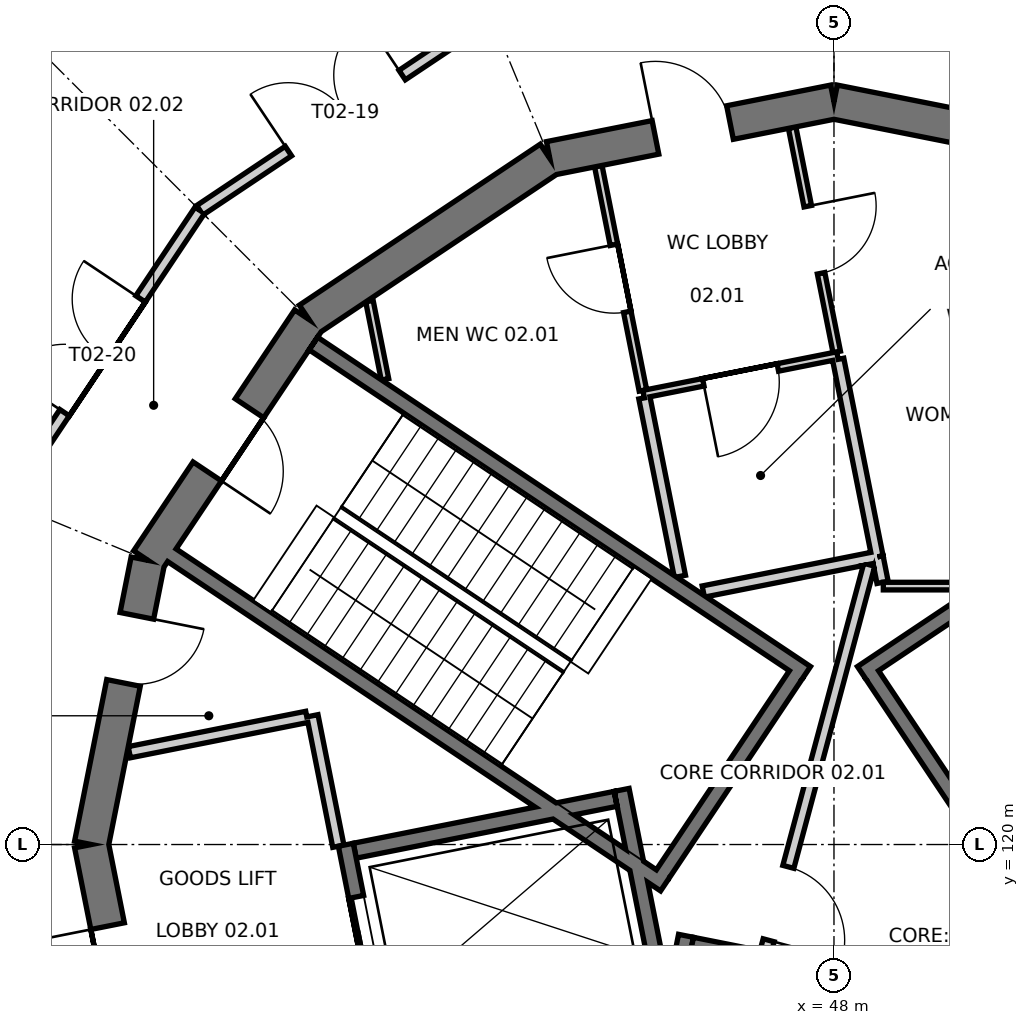
"""IFC4 building model, lengths in metres.
Left out: names, types, materials, properties, quantities, classifications, styles, units other than length and angle.
Written with IfcOpenShell. Run it as: python <this file> out.ifc"""

import sys

from ifc_helpers import new_model, si_unit, direction, frame, frame_2d, origin, place, context, subcontext, project, spatial, polyline, rectangle, outline, extrude, element, fill, save


model = new_model("IFC4")
c1 = context("Model", 3, precision=1e-05, world=origin(), true_north=direction((0.0, 1.0)))
c2 = subcontext(c1, "Body", "Model", "MODEL_VIEW")
j1 = project(units=[si_unit("LENGTHUNIT", "METRE"), si_unit("PLANEANGLEUNIT", "RADIAN")], contexts=[c1])
p1 = place(None, origin())
s1 = spatial("IfcSite", under=j1, at=p1, CompositionType="ELEMENT")
p2 = place(p1, origin())
s2 = spatial("IfcBuilding", under=s1, at=p2, CompositionType="ELEMENT")
p3 = place(p2, frame((0.0, 0.0, 10.8)))
s3 = spatial("IfcBuildingStorey", under=s2, at=p3, CompositionType="ELEMENT", Elevation=10.8)
p4 = place(p3, frame((51.739, 129.027, 0.0), z_axis=(0.0, 0.0, 1.0), x_axis=(-0.98078948206, 0.195069197673, 0.0)))
e1 = element("IfcWall", 1, at=p4, inside=s3, PredefinedType="SHEAR", context=c2, shape_type="SweptSolid", body=[
    extrude(outline(polyline([(-0.045, -0.225), (3.857, -0.225), (3.768, 0.225), (0.045, 0.225), (-0.045, -0.225)])), origin(), (0.0, 0.0, 1.0), 4.8),
])
p5 = place(p3, frame((48.0, 129.771, 0.0), z_axis=(0.0, 0.0, 1.0), x_axis=(-0.98078948206, -0.195069197673, 0.0)))
e2 = element("IfcWall", 2, at=p5, inside=s3, PredefinedType="SHEAR", context=c2, shape_type="SweptSolid", body=[
    extrude(outline(polyline([(-0.045, -0.225), (3.857, -0.225), (3.768, 0.225), (0.045, 0.225), (-0.045, -0.225)])), origin(), (0.0, 0.0, 1.0), 4.8),
])
p6 = place(p5, frame((1.395, 0.0, 0.0)))
e3 = element("IfcOpeningElement", 3, at=p6, cuts=e2, PredefinedType="OPENING", context=c2, shape_type="SweptSolid", body=[
    extrude(rectangle(XDim=1.0, YDim=2.1, at=frame_2d((0.5, 1.05))), frame((0.0, 0.235, 0.0), z_axis=(0.0, -1.0, 0.0), x_axis=(1.0, 0.0, 0.0)), (0.0, 0.0, 1.0), 0.47),
])
p7 = place(p3, frame((44.261, 129.027, 0.0), z_axis=(0.0, 0.0, 1.0), x_axis=(-0.83148829117, -0.555542277102, 0.0)))
e4 = element("IfcWall", 4, at=p7, inside=s3, PredefinedType="SHEAR", context=c2, shape_type="SweptSolid", body=[
    extrude(outline(polyline([(-0.045, -0.225), (3.857, -0.225), (3.768, 0.225), (0.045, 0.225), (-0.045, -0.225)])), origin(), (0.0, 0.0, 1.0), 4.8),
])
p8 = place(p3, frame((41.091, 126.909, 0.0), z_axis=(0.0, 0.0, 1.0), x_axis=(-0.555542277102, -0.83148829117, 0.0)))
e5 = element("IfcWall", 5, at=p8, inside=s3, PredefinedType="SHEAR", context=c2, shape_type="SweptSolid", body=[
    extrude(outline(polyline([(-0.045, -0.225), (3.857, -0.225), (3.768, 0.225), (0.045, 0.225), (-0.045, -0.225)])), origin(), (0.0, 0.0, 1.0), 4.8),
])
p9 = place(p8, frame((1.406, 0.0, 0.0)))
e6 = element("IfcOpeningElement", 6, at=p9, cuts=e5, PredefinedType="OPENING", context=c2, shape_type="SweptSolid", body=[
    extrude(rectangle(XDim=1.0, YDim=2.1, at=frame_2d((0.5, 1.05))), frame((0.0, 0.235, 0.0), z_axis=(0.0, -1.0, 0.0), x_axis=(1.0, 0.0, 0.0)), (0.0, 0.0, 1.0), 0.47),
])
p10 = place(p3, frame((38.973, 123.739, 0.0), z_axis=(0.0, 0.0, 1.0), x_axis=(-0.195069197673, -0.98078948206, 0.0)))
e7 = element("IfcWall", 7, at=p10, inside=s3, PredefinedType="SHEAR", context=c2, shape_type="SweptSolid", body=[
    extrude(outline(polyline([(-0.045, -0.225), (3.857, -0.225), (3.768, 0.225), (0.045, 0.225), (-0.045, -0.225)])), origin(), (0.0, 0.0, 1.0), 4.8),
])
p11 = place(p10, frame((0.745, 0.0, 0.0)))
e8 = element("IfcOpeningElement", 8, at=p11, cuts=e7, PredefinedType="OPENING", context=c2, shape_type="SweptSolid", body=[
    extrude(rectangle(XDim=0.9, YDim=2.1, at=frame_2d((0.45, 1.05))), frame((0.0, 0.235, 0.0), z_axis=(0.0, -1.0, 0.0), x_axis=(1.0, 0.0, 0.0)), (0.0, 0.0, 1.0), 0.47),
])
p12 = place(p3, frame((38.229, 120.0, 0.0), z_axis=(0.0, 0.0, 1.0), x_axis=(0.195069197673, -0.98078948206, 0.0)))
e9 = element("IfcWall", 9, at=p12, inside=s3, PredefinedType="SHEAR", context=c2, shape_type="SweptSolid", body=[
    extrude(outline(polyline([(-0.045, -0.225), (3.857, -0.225), (3.768, 0.225), (0.045, 0.225), (-0.045, -0.225)])), origin(), (0.0, 0.0, 1.0), 4.8),
])
p13 = place(p12, frame((1.095, 0.0, 0.0)))
e10 = element("IfcOpeningElement", 10, at=p13, cuts=e9, PredefinedType="OPENING", context=c2, shape_type="SweptSolid", body=[
    extrude(rectangle(XDim=1.6, YDim=2.1, at=frame_2d((0.8, 1.05))), frame((0.0, 0.235, 0.0), z_axis=(0.0, -1.0, 0.0), x_axis=(1.0, 0.0, 0.0)), (0.0, 0.0, 1.0), 0.47),
])
p14 = place(p3, frame((48.365, 122.258, 0.0), z_axis=(0.0, 0.0, 1.0), x_axis=(0.831476803301, 0.555559470779, 0.0)))
e11 = element("IfcWall", 11, at=p14, inside=s3, PredefinedType="SHEAR", context=c2, shape_type="SweptSolid", body=[
    extrude(rectangle(XDim=7.8, YDim=0.2, at=frame_2d((3.9, 0.0))), origin(), (0.0, 0.0, 1.0), 4.8),
])
p15 = place(p3, frame((50.253, 119.612, 0.0), z_axis=(0.0, 0.0, 1.0), x_axis=(-0.55555842186, 0.831477504146, 0.0)))
e12 = element("IfcWall", 12, at=p15, inside=s3, PredefinedType="SHEAR", context=c2, shape_type="SweptSolid", body=[
    extrude(rectangle(XDim=3.15, YDim=0.2, at=frame_2d((1.575, 0.0))), origin(), (0.0, 0.0, 1.0), 4.8),
])
p16 = place(p3, frame((45.774, 119.473, 0.0), z_axis=(0.0, 0.0, 1.0), x_axis=(-0.831486463828, 0.555545012102, 0.0)))
e13 = element("IfcWall", 13, at=p16, inside=s3, PredefinedType="SHEAR", context=c2, shape_type="SweptSolid", body=[
    extrude(rectangle(XDim=7.8, YDim=0.2, at=frame_2d((3.9, 0.0))), origin(), (0.0, 0.0, 1.0), 4.8),
])
p17 = place(p3, frame((47.635, 122.258, 0.0), z_axis=(0.0, 0.0, 1.0), x_axis=(-0.831476803301, 0.555559470779, 0.0)))
e14 = element("IfcWall", 14, at=p17, inside=s3, PredefinedType="SHEAR", context=c2, shape_type="SweptSolid", body=[
    extrude(rectangle(XDim=7.8, YDim=0.2, at=frame_2d((3.9, 0.0))), origin(), (0.0, 0.0, 1.0), 4.8),
])
p18 = place(p3, frame((47.497, 122.231, 0.0), z_axis=(0.0, 0.0, 1.0), x_axis=(-0.55555842186, -0.831477504146, 0.0)))
e15 = element("IfcWall", 15, at=p18, inside=s3, PredefinedType="SHEAR", context=c2, shape_type="SweptSolid", body=[
    extrude(rectangle(XDim=3.15, YDim=0.2, at=frame_2d((1.575, 0.0))), origin(), (0.0, 0.0, 1.0), 4.8),
])
p19 = place(p3, frame((46.053, 118.799, 0.0), z_axis=(0.0, 0.0, 1.0), x_axis=(-0.195092759861, -0.980784795483, 0.0)))
e16 = element("IfcWall", 16, at=p19, inside=s3, PredefinedType="SHEAR", context=c2, shape_type="SweptSolid", body=[
    extrude(rectangle(XDim=7.8, YDim=0.2, at=frame_2d((3.9, 0.0))), origin(), (0.0, 0.0, 1.0), 4.8),
])
p20 = place(p3, frame((46.132, 118.681, 0.0), z_axis=(0.0, 0.0, 1.0), x_axis=(0.980785830564, -0.195087556151, 0.0)))
e17 = element("IfcWall", 17, at=p20, inside=s3, PredefinedType="SHEAR", context=c2, shape_type="SweptSolid", body=[
    extrude(rectangle(XDim=3.15, YDim=0.2, at=frame_2d((1.575, 0.0))), origin(), (0.0, 0.0, 1.0), 4.8),
])
p21 = place(p3, frame((41.577, 119.997, 0.0), z_axis=(0.0, 0.0, 1.0), x_axis=(0.195120673769, -0.980779242576, 0.0)))
e18 = element("IfcWall", 18, at=p21, inside=s3, PredefinedType="SHEAR", context=c2, shape_type="SweptSolid", body=[
    extrude(rectangle(XDim=2.5, YDim=0.2, at=frame_2d((1.25, 0.0))), origin(), (0.0, 0.0, 1.0), 4.8),
])
p22 = place(p21, frame((0.7, 0.0, 0.0)))
e19 = element("IfcOpeningElement", 19, at=p22, cuts=e18, PredefinedType="OPENING", context=c2, shape_type="SweptSolid", body=[
    extrude(rectangle(XDim=1.1, YDim=2.1, at=frame_2d((0.55, 1.05))), frame((0.0, 0.11, 0.0), z_axis=(0.0, -1.0, 0.0), x_axis=(1.0, 0.0, 0.0)), (0.0, 0.0, 1.0), 0.22),
])
p23 = place(p3, frame((45.206, 120.719, 0.0), z_axis=(0.0, 0.0, 1.0), x_axis=(0.195158270522, -0.980771762158, 0.0)))
e20 = element("IfcWall", 20, at=p23, inside=s3, PredefinedType="SHEAR", context=c2, shape_type="SweptSolid", body=[
    extrude(rectangle(XDim=2.647, YDim=0.2, at=frame_2d((1.323, 0.0))), origin(), (0.0, 0.0, 1.0), 4.8),
])
p24 = place(p3, frame((45.127, 120.601, 0.0), z_axis=(0.0, 0.0, 1.0), x_axis=(-0.980794727808, -0.195042820694, 0.0)))
e21 = element("IfcWall", 21, at=p24, inside=s3, PredefinedType="SHEAR", context=c2, shape_type="SweptSolid", body=[
    extrude(rectangle(XDim=3.5, YDim=0.2, at=frame_2d((1.75, 0.0))), origin(), (0.0, 0.0, 1.0), 4.8),
])
p25 = place(p3, frame((41.479, 119.977, 0.0), z_axis=(0.0, 0.0, 1.0), x_axis=(-0.19501613536, 0.98080003413, 0.0)))
e22 = element("IfcWall", 22, at=p25, inside=s3, PredefinedType="PARTITIONING", context=c2, shape_type="SweptSolid", body=[
    extrude(rectangle(XDim=1.75, YDim=0.15, at=frame_2d((0.875, 0.0))), origin(), (0.0, 0.0, 1.0), 4.52),
])
p26 = place(p3, frame((41.064, 121.679, 0.0), z_axis=(0.0, 0.0, 1.0), x_axis=(-0.980781272394, -0.195110470559, 0.0)))
e23 = element("IfcWall", 23, at=p26, inside=s3, PredefinedType="PARTITIONING", context=c2, shape_type="SweptSolid", body=[
    extrude(rectangle(XDim=2.381, YDim=0.15, at=frame_2d((1.19, 0.0))), origin(), (0.0, 0.0, 1.0), 4.52),
])
p27 = place(p3, frame((48.046, 126.433, 0.0), z_axis=(0.0, 0.0, 1.0), x_axis=(-0.980778805994, -0.195122868248, 0.0)))
e24 = element("IfcWall", 24, at=p27, inside=s3, PredefinedType="PARTITIONING", context=c2, shape_type="SweptSolid", body=[
    extrude(rectangle(XDim=2.6, YDim=0.1, at=frame_2d((1.3, 0.0))), origin(), (0.0, 0.0, 1.0), 4.52),
])
p28 = place(p27, frame((0.8, 0.0, 0.0)))
e25 = element("IfcOpeningElement", 25, at=p28, cuts=e24, PredefinedType="OPENING", context=c2, shape_type="SweptSolid", body=[
    extrude(rectangle(XDim=1.0, YDim=2.1, at=frame_2d((0.5, 1.05))), frame((0.0, 0.06, 0.0), z_axis=(0.0, -1.0, 0.0), x_axis=(1.0, 0.0, 0.0)), (0.0, 0.0, 1.0), 0.12),
])
p29 = place(p3, frame((45.486, 125.974, 0.0), z_axis=(0.0, 0.0, 1.0), x_axis=(-0.195054549846, 0.980792395252, 0.0)))
e26 = element("IfcWall", 26, at=p29, inside=s3, PredefinedType="PARTITIONING", context=c2, shape_type="SweptSolid", body=[
    extrude(rectangle(XDim=3.008, YDim=0.1, at=frame_2d((1.504, 0.0))), origin(), (0.0, 0.0, 1.0), 4.52),
])
p30 = place(p29, frame((1.054, 0.0, 0.0)))
e27 = element("IfcOpeningElement", 27, at=p30, cuts=e26, PredefinedType="OPENING", context=c2, shape_type="SweptSolid", body=[
    extrude(rectangle(XDim=0.9, YDim=2.1, at=frame_2d((0.45, 1.05))), frame((0.0, 0.06, 0.0), z_axis=(0.0, -1.0, 0.0), x_axis=(1.0, 0.0, 0.0)), (0.0, 0.0, 1.0), 0.12),
])
p31 = place(p3, frame((47.449, 129.432, 0.0), z_axis=(0.0, 0.0, 1.0), x_axis=(0.195054549846, -0.980792395252, 0.0)))
e28 = element("IfcWall", 28, at=p31, inside=s3, PredefinedType="PARTITIONING", context=c2, shape_type="SweptSolid", body=[
    extrude(rectangle(XDim=3.008, YDim=0.1, at=frame_2d((1.504, 0.0))), origin(), (0.0, 0.0, 1.0), 4.52),
])
p32 = place(p31, frame((1.054, 0.0, 0.0)))
e29 = element("IfcOpeningElement", 29, at=p32, cuts=e28, PredefinedType="OPENING", context=c2, shape_type="SweptSolid", body=[
    extrude(rectangle(XDim=0.9, YDim=2.1, at=frame_2d((0.45, 1.05))), frame((0.0, 0.06, 0.0), z_axis=(0.0, -1.0, 0.0), x_axis=(1.0, 0.0, 0.0)), (0.0, 0.0, 1.0), 0.12),
])
p33 = place(p3, frame((48.056, 126.384, 0.0), z_axis=(0.0, 0.0, 1.0), x_axis=(0.195123903338, -0.980778600065, 0.0)))
e30 = element("IfcWall", 30, at=p33, inside=s3, PredefinedType="PARTITIONING", context=c2, shape_type="SweptSolid", body=[
    extrude(rectangle(XDim=2.65, YDim=0.15, at=frame_2d((1.325, 0.0))), origin(), (0.0, 0.0, 1.0), 4.52),
])
p34 = place(p3, frame((48.524, 123.775, 0.0), z_axis=(0.0, 0.0, 1.0), x_axis=(-0.980777249161, -0.195130693455, 0.0)))
e31 = element("IfcWall", 31, at=p34, inside=s3, PredefinedType="PARTITIONING", context=c2, shape_type="SweptSolid", body=[
    extrude(rectangle(XDim=2.287, YDim=0.15, at=frame_2d((1.144, 0.0))), origin(), (0.0, 0.0, 1.0), 4.52),
])
p35 = place(p3, frame((45.973, 123.528, 0.0), z_axis=(0.0, 0.0, 1.0), x_axis=(-0.195135731435, 0.980776246815, 0.0)))
e32 = element("IfcWall", 32, at=p35, inside=s3, PredefinedType="PARTITIONING", context=c2, shape_type="SweptSolid", body=[
    extrude(rectangle(XDim=2.395, YDim=0.15, at=frame_2d((1.197, 0.0))), origin(), (0.0, 0.0, 1.0), 4.52),
])
p36 = place(p3, frame((42.093, 126.12, 0.0), z_axis=(0.0, 0.0, 1.0), x_axis=(-0.195175461866, 0.980768341192, 0.0)))
e33 = element("IfcWall", 33, at=p36, inside=s3, PredefinedType="PARTITIONING", context=c2, shape_type="SweptSolid", body=[
    extrude(rectangle(XDim=1.048, YDim=0.1, at=frame_2d((0.524, 0.0))), origin(), (0.0, 0.0, 1.0), 4.52),
])
p37 = place(p3, frame((49.823, 123.4, 0.0), z_axis=(0.0, 0.0, 1.0), x_axis=(-1.0, 0.0, 0.0)))
e34 = element("IfcWall", 34, at=p37, inside=s3, PredefinedType="PARTITIONING", context=c2, shape_type="SweptSolid", body=[
    extrude(rectangle(XDim=1.174, YDim=0.1, at=frame_2d((0.587, 0.0))), origin(), (0.0, 0.0, 1.0), 4.52),
])
p38 = place(p3, frame((48.639, 123.449, 0.0), z_axis=(0.0, 0.0, 1.0), x_axis=(-0.194880473507, 0.98082699853, 0.0)))
e35 = element("IfcWall", 35, at=p38, inside=s3, PredefinedType="PARTITIONING", context=c2, shape_type="SweptSolid", body=[
    extrude(rectangle(XDim=0.342, YDim=0.15, at=frame_2d((0.171, 0.0))), origin(), (0.0, 0.0, 1.0), 4.52),
])
p39 = place(p3, frame((47.102, 118.595, 0.0), z_axis=(0.0, 0.0, 1.0), x_axis=(0.258814124304, 0.9659271448, 0.0)))
e36 = element("IfcWall", 36, at=p39, inside=s3, PredefinedType="PARTITIONING", context=c2, shape_type="SweptSolid", body=[
    extrude(rectangle(XDim=5.265, YDim=0.15, at=frame_2d((2.632, 0.0))), origin(), (0.0, 0.0, 1.0), 4.52),
])
p40 = place(p39, frame((0.15, 0.0, 0.0)))
e37 = element("IfcOpeningElement", 37, at=p40, cuts=e36, PredefinedType="OPENING", context=c2, shape_type="SweptSolid", body=[
    extrude(rectangle(XDim=1.0, YDim=2.1, at=frame_2d((0.5, 1.05))), frame((0.0, 0.085, 0.0), z_axis=(0.0, -1.0, 0.0), x_axis=(1.0, 0.0, 0.0)), (0.0, 0.0, 1.0), 0.17),
])
p41 = place(p3, frame((37.098, 124.516, 0.0), z_axis=(0.0, 0.0, 1.0), x_axis=(0.555544233776, 0.831486983854, 0.0)))
e38 = element("IfcWall", 38, at=p41, inside=s3, PredefinedType="PARTITIONING", context=c2, shape_type="SweptSolid", body=[
    extrude(rectangle(XDim=4.604, YDim=0.15, at=frame_2d((2.302, 0.0))), origin(), (0.0, 0.0, 1.0), 4.52),
])
p42 = place(p41, frame((1.402, 0.0, 0.0)))
e39 = element("IfcOpeningElement", 39, at=p42, cuts=e38, PredefinedType="OPENING", context=c2, shape_type="SweptSolid", body=[
    extrude(rectangle(XDim=1.8, YDim=2.1, at=frame_2d((0.9, 1.05))), frame((0.0, 0.085, 0.0), z_axis=(0.0, -1.0, 0.0), x_axis=(1.0, 0.0, 0.0)), (0.0, 0.0, 1.0), 0.17),
])
p43 = place(p3, frame((39.656, 128.344, 0.0), z_axis=(0.0, 0.0, 1.0), x_axis=(0.831486983854, 0.555544233776, 0.0)))
e40 = element("IfcWall", 40, at=p43, inside=s3, PredefinedType="PARTITIONING", context=c2, shape_type="SweptSolid", body=[
    extrude(rectangle(XDim=4.604, YDim=0.15, at=frame_2d((2.302, 0.0))), origin(), (0.0, 0.0, 1.0), 4.52),
])
p44 = place(p43, frame((1.402, 0.0, 0.0)))
e41 = element("IfcOpeningElement", 41, at=p44, cuts=e40, PredefinedType="OPENING", context=c2, shape_type="SweptSolid", body=[
    extrude(rectangle(XDim=1.8, YDim=2.1, at=frame_2d((0.9, 1.05))), frame((0.0, 0.085, 0.0), z_axis=(0.0, -1.0, 0.0), x_axis=(1.0, 0.0, 0.0)), (0.0, 0.0, 1.0), 0.17),
])
p45 = place(p9, origin())
e42 = element("IfcDoor", 42, at=p45, inside=s3, OperationType="SINGLE_SWING_RIGHT", PredefinedType="DOOR", context=c2, shape_type="SweptSolid", body=[
    extrude(rectangle(XDim=1.0, YDim=2.1, at=frame_2d((0.5, 1.05))), frame((0.0, 0.025, 0.0), z_axis=(0.0, -1.0, 0.0), x_axis=(1.0, 0.0, 0.0)), (0.0, 0.0, 1.0), 0.05),
])
fill(e6, e42)
p46 = place(p22, origin())
e43 = element("IfcDoor", 43, at=p46, inside=s3, OperationType="SLIDING_TO_LEFT", PredefinedType="DOOR", context=c2, shape_type="SweptSolid", body=[
    extrude(rectangle(XDim=1.1, YDim=2.1, at=frame_2d((0.55, 1.05))), frame((0.0, 0.025, 0.0), z_axis=(0.0, -1.0, 0.0), x_axis=(1.0, 0.0, 0.0)), (0.0, 0.0, 1.0), 0.05),
])
fill(e19, e43)
p47 = place(p13, frame((1.6, 0.0, 0.0), z_axis=(0.0, 0.0, 1.0), x_axis=(-1.0, 0.0, 0.0)))
e44 = element("IfcDoor", 44, at=p47, inside=s3, OperationType="DOUBLE_DOOR_SINGLE_SWING", PredefinedType="DOOR", context=c2, shape_type="SweptSolid", body=[
    extrude(rectangle(XDim=1.6, YDim=2.1, at=frame_2d((0.8, 1.05))), frame((0.0, 0.025, 0.0), z_axis=(0.0, -1.0, 0.0), x_axis=(1.0, 0.0, 0.0)), (0.0, 0.0, 1.0), 0.05),
])
fill(e10, e44)
p48 = place(p6, frame((1.0, 0.0, 0.0), z_axis=(0.0, 0.0, 1.0), x_axis=(-1.0, 0.0, 0.0)))
e45 = element("IfcDoor", 45, at=p48, inside=s3, OperationType="SINGLE_SWING_LEFT", PredefinedType="DOOR", context=c2, shape_type="SweptSolid", body=[
    extrude(rectangle(XDim=1.0, YDim=2.1, at=frame_2d((0.5, 1.05))), frame((0.0, 0.025, 0.0), z_axis=(0.0, -1.0, 0.0), x_axis=(1.0, 0.0, 0.0)), (0.0, 0.0, 1.0), 0.05),
])
fill(e3, e45)
p49 = place(p11, origin())
e46 = element("IfcDoor", 46, at=p49, inside=s3, OperationType="SINGLE_SWING_LEFT", PredefinedType="DOOR", context=c2, shape_type="SweptSolid", body=[
    extrude(rectangle(XDim=0.9, YDim=2.1, at=frame_2d((0.45, 1.05))), frame((0.0, 0.025, 0.0), z_axis=(0.0, -1.0, 0.0), x_axis=(1.0, 0.0, 0.0)), (0.0, 0.0, 1.0), 0.05),
])
fill(e8, e46)
p50 = place(p28, origin())
e47 = element("IfcDoor", 47, at=p50, inside=s3, OperationType="SINGLE_SWING_RIGHT", PredefinedType="DOOR", context=c2, shape_type="SweptSolid", body=[
    extrude(rectangle(XDim=1.0, YDim=2.1, at=frame_2d((0.5, 1.05))), frame((0.0, 0.025, 0.0), z_axis=(0.0, -1.0, 0.0), x_axis=(1.0, 0.0, 0.0)), (0.0, 0.0, 1.0), 0.05),
])
fill(e25, e47)
p51 = place(p30, origin())
e48 = element("IfcDoor", 48, at=p51, inside=s3, OperationType="SINGLE_SWING_RIGHT", PredefinedType="DOOR", context=c2, shape_type="SweptSolid", body=[
    extrude(rectangle(XDim=0.9, YDim=2.1, at=frame_2d((0.45, 1.05))), frame((0.0, 0.025, 0.0), z_axis=(0.0, -1.0, 0.0), x_axis=(1.0, 0.0, 0.0)), (0.0, 0.0, 1.0), 0.05),
])
fill(e27, e48)
p52 = place(p32, origin())
e49 = element("IfcDoor", 49, at=p52, inside=s3, OperationType="SINGLE_SWING_LEFT", PredefinedType="DOOR", context=c2, shape_type="SweptSolid", body=[
    extrude(rectangle(XDim=0.9, YDim=2.1, at=frame_2d((0.45, 1.05))), frame((0.0, 0.025, 0.0), z_axis=(0.0, -1.0, 0.0), x_axis=(1.0, 0.0, 0.0)), (0.0, 0.0, 1.0), 0.05),
])
fill(e29, e49)
p53 = place(p40, frame((1.0, 0.0, 0.0), z_axis=(0.0, 0.0, 1.0), x_axis=(-1.0, 0.0, 0.0)))
e50 = element("IfcDoor", 50, at=p53, inside=s3, OperationType="SINGLE_SWING_RIGHT", PredefinedType="DOOR", context=c2, shape_type="SweptSolid", body=[
    extrude(rectangle(XDim=1.0, YDim=2.1, at=frame_2d((0.5, 1.05))), frame((0.0, 0.025, 0.0), z_axis=(0.0, -1.0, 0.0), x_axis=(1.0, 0.0, 0.0)), (0.0, 0.0, 1.0), 0.05),
])
fill(e37, e50)
p54 = place(p44, origin())
e51 = element("IfcDoor", 51, at=p54, inside=s3, OperationType="DOUBLE_DOOR_SINGLE_SWING", PredefinedType="DOOR", context=c2, shape_type="SweptSolid", body=[
    extrude(rectangle(XDim=1.8, YDim=2.1, at=frame_2d((0.9, 1.05))), frame((0.0, 0.025, 0.0), z_axis=(0.0, -1.0, 0.0), x_axis=(1.0, 0.0, 0.0)), (0.0, 0.0, 1.0), 0.05),
])
fill(e41, e51)
p55 = place(p42, origin())
e52 = element("IfcDoor", 52, at=p55, inside=s3, OperationType="DOUBLE_DOOR_SINGLE_SWING", PredefinedType="DOOR", context=c2, shape_type="SweptSolid", body=[
    extrude(rectangle(XDim=1.8, YDim=2.1, at=frame_2d((0.9, 1.05))), frame((0.0, 0.025, 0.0), z_axis=(0.0, -1.0, 0.0), x_axis=(1.0, 0.0, 0.0)), (0.0, 0.0, 1.0), 0.05),
])
fill(e39, e52)
save(model, sys.argv[1])
